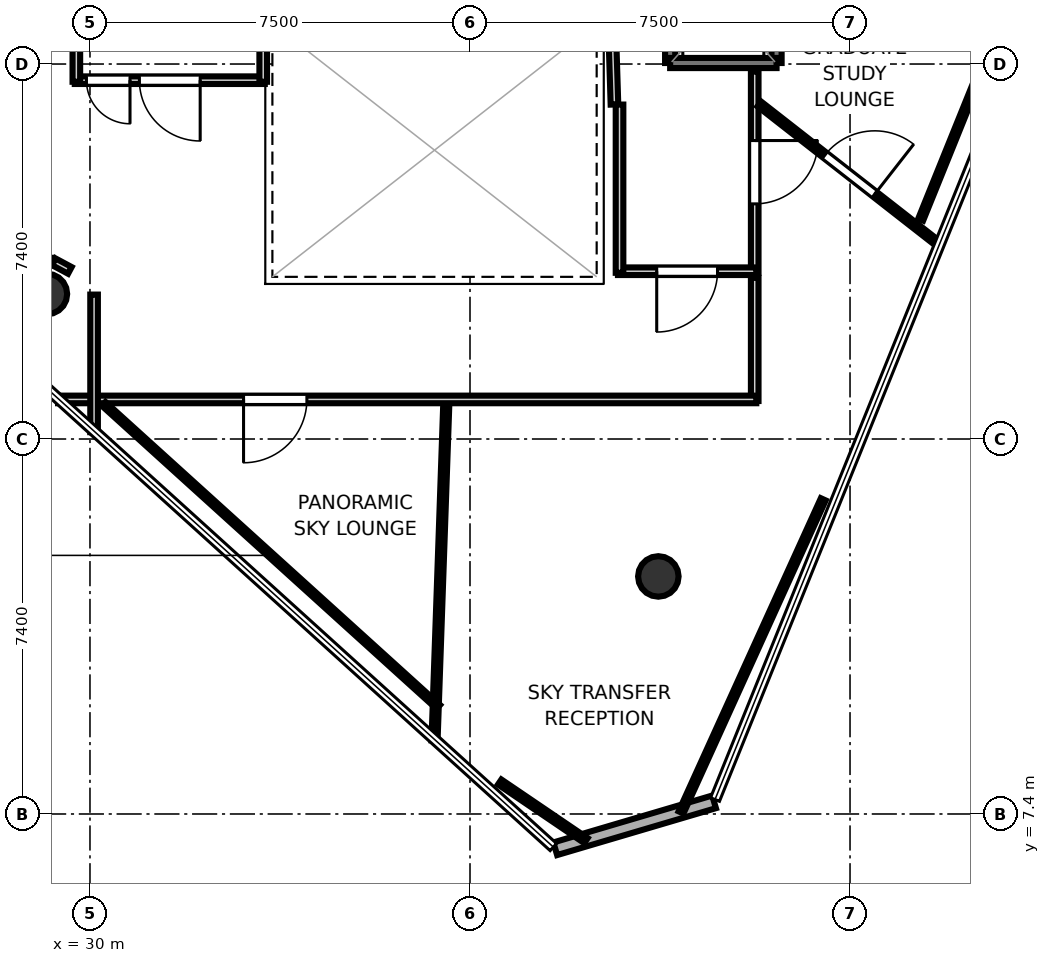
"""IFC4 building model, lengths in metres.
Left out: names, types, materials, properties, quantities, classifications, styles, units other than length and angle.
Written with IfcOpenShell. Run it as: python <this file> out.ifc"""

import sys

from ifc_helpers import new_model, si_unit, direction, frame, frame_2d, origin, origin_2d, place, context, subcontext, project, spatial, rectangle, hollow_circle, extrude, element, fill, save


model = new_model("IFC4")
c1 = context("Model", 3, precision=1e-05, world=origin(), true_north=direction((0.0, 1.0)))
c2 = subcontext(c1, "Body", "Model", "MODEL_VIEW")
j1 = project(units=[si_unit("LENGTHUNIT", "METRE"), si_unit("PLANEANGLEUNIT", "RADIAN")], contexts=[c1])
p1 = place(None, origin())
s1 = spatial("IfcSite", under=j1, at=p1, CompositionType="ELEMENT")
p2 = place(p1, origin())
s2 = spatial("IfcBuilding", under=s1, at=p2, CompositionType="ELEMENT")
p3 = place(p2, frame((0.0, 0.0, 351.8)))
s3 = spatial("IfcBuildingStorey", under=s2, at=p3, CompositionType="ELEMENT", Elevation=351.8)
for number, where, z_axis, x_axis in (
    (1, (29.15, 17.662, 0.0), (0.0, 0.0, 1.0), (1.0, 0.0, 0.0)),
    (2, (41.217, 12.088, 0.0), (0.0, 0.0, 1.0), (1.0, 0.0, 0.0)),
):
    element("IfcColumn", number, at=place(p3, frame(where, z_axis=z_axis, x_axis=x_axis)), inside=s3, PredefinedType="COLUMN", context=c2, shape_type="SweptSolid", body=[
        extrude(hollow_circle(Radius=0.4, WallThickness=0.022, at=origin_2d()), origin(), (0.0, 0.0, 1.0), 4.5),
    ])
p4 = place(p3, frame((39.183, 6.714, 0.0), z_axis=(0.0, 0.0, 1.0), x_axis=(0.959059220101, 0.283205600826, 0.0)))
e3 = element("IfcWall", 3, at=p4, inside=s3, PredefinedType="SOLIDWALL", context=c2, shape_type="SweptSolid", body=[
    extrude(rectangle(XDim=3.268, YDim=0.26, at=frame_2d((1.634, 0.0))), origin(), (0.0, 0.0, 1.0), 4.3),
])
p5 = place(p3, frame((43.55, 22.22, 0.0), z_axis=(0.0, 0.0, 1.0), x_axis=(0.0, 1.0, 0.0)))
e4 = element("IfcWall", 4, at=p5, inside=s3, PredefinedType="SOLIDWALL", context=c2, shape_type="SweptSolid", body=[
    extrude(rectangle(XDim=2.36, YDim=0.2, at=frame_2d((1.18, 0.0))), origin(), (0.0, 0.0, 1.0), 4.3),
])
p6 = place(p3, frame((41.45, 22.22, 0.0), z_axis=(0.0, 0.0, 1.0), x_axis=(0.0, 1.0, 0.0)))
e5 = element("IfcWall", 5, at=p6, inside=s3, PredefinedType="SOLIDWALL", context=c2, shape_type="SweptSolid", body=[
    extrude(rectangle(XDim=2.36, YDim=0.2, at=frame_2d((1.18, 0.0))), origin(), (0.0, 0.0, 1.0), 4.3),
])
p7 = place(p6, frame((0.63, 0.0, 0.0)))
e6 = element("IfcOpeningElement", 6, at=p7, cuts=e5, PredefinedType="OPENING", context=c2, shape_type="SweptSolid", body=[
    extrude(rectangle(XDim=1.1, YDim=2.15, at=frame_2d((0.55, 1.075))), frame((0.0, 0.11, 0.0), z_axis=(0.0, -1.0, 0.0), x_axis=(1.0, 0.0, 0.0)), (0.0, 0.0, 1.0), 0.22),
])
p8 = place(p3, frame((41.45, 22.22, 0.0), z_axis=(0.0, 0.0, 1.0), x_axis=(1.0, 0.0, 0.0)))
e7 = element("IfcWall", 7, at=p8, inside=s3, PredefinedType="SOLIDWALL", context=c2, shape_type="SweptSolid", body=[
    extrude(rectangle(XDim=2.1, YDim=0.2, at=frame_2d((1.05, 0.0))), origin(), (0.0, 0.0, 1.0), 4.3),
])
p9 = place(p3, frame((33.45, 21.881, 0.0), z_axis=(0.0, 0.0, 1.0), x_axis=(-1.0, 0.0, 0.0)))
e8 = element("IfcWall", 8, at=p9, inside=s3, PredefinedType="PARTITIONING", context=c2, shape_type="SweptSolid", body=[
    extrude(rectangle(XDim=3.75, YDim=0.15, at=frame_2d((1.875, 0.0))), origin(), (0.0, 0.0, 1.0), 2.82),
])
p10 = place(p9, frame((1.275, 0.0, 0.0)))
e9 = element("IfcOpeningElement", 9, at=p10, cuts=e8, PredefinedType="OPENING", context=c2, shape_type="SweptSolid", body=[
    extrude(rectangle(XDim=1.2, YDim=2.15, at=frame_2d((0.6, 1.075))), frame((0.0, 0.085, 0.0), z_axis=(0.0, -1.0, 0.0), x_axis=(1.0, 0.0, 0.0)), (0.0, 0.0, 1.0), 0.17),
])
p11 = place(p9, frame((2.66, 0.0, 0.0)))
e10 = element("IfcOpeningElement", 10, at=p11, cuts=e8, PredefinedType="OPENING", context=c2, shape_type="SweptSolid", body=[
    extrude(rectangle(XDim=0.86, YDim=2.05, at=frame_2d((0.43, 1.025))), frame((0.0, 0.085, 0.0), z_axis=(0.0, -1.0, 0.0), x_axis=(1.0, 0.0, 0.0)), (0.0, 0.0, 1.0), 0.17),
])
for number, where, z_axis, x_axis in (
    (11, (29.731, 21.85, 0.0), (0.0, 0.0, 1.0), (0.0, 1.0, 0.0)),
    (12, (33.419, 24.542, 0.0), (0.0, 0.0, 1.0), (0.0, -1.0, 0.0)),
):
    element("IfcWall", number, at=place(p3, frame(where, z_axis=z_axis, x_axis=x_axis)), inside=s3, PredefinedType="PARTITIONING", context=c2, shape_type="SweptSolid", body=[
        extrude(rectangle(XDim=2.692, YDim=0.15, at=frame_2d((1.346, 0.0))), origin(), (0.0, 0.0, 1.0), 2.82),
    ])
p12 = place(p3, frame((40.351, 21.401, 0.0), z_axis=(0.0, 0.0, 1.0), x_axis=(-0.031058045979, 0.999517582527, 0.0)))
e13 = element("IfcWall", 13, at=p12, inside=s3, PredefinedType="PARTITIONING", context=c2, shape_type="SweptSolid", body=[
    extrude(rectangle(XDim=1.682, YDim=0.15, at=frame_2d((0.841, 0.0))), origin(), (0.0, 0.0, 1.0), 2.82),
])
p13 = place(p3, frame((43.119, 22.05, 0.0), z_axis=(0.0, 0.0, 1.0), x_axis=(0.0, -1.0, 0.0)))
e14 = element("IfcWall", 14, at=p13, inside=s3, PredefinedType="PARTITIONING", context=c2, shape_type="SweptSolid", body=[
    extrude(rectangle(XDim=3.97, YDim=0.15, at=frame_2d((1.985, 0.0))), origin(), (0.0, 0.0, 1.0), 2.82),
])
p14 = place(p13, frame((1.36, 0.0, 0.0)))
e15 = element("IfcOpeningElement", 15, at=p14, cuts=e14, PredefinedType="OPENING", context=c2, shape_type="SweptSolid", body=[
    extrude(rectangle(XDim=1.25, YDim=2.2, at=frame_2d((0.625, 1.1))), frame((0.0, 0.085, 0.0), z_axis=(0.0, -1.0, 0.0), x_axis=(1.0, 0.0, 0.0)), (0.0, 0.0, 1.0), 0.17),
])
p15 = place(p3, frame((43.15, 18.111, 0.0), z_axis=(0.0, 0.0, 1.0), x_axis=(-1.0, 0.0, 0.0)))
e16 = element("IfcWall", 16, at=p15, inside=s3, PredefinedType="PARTITIONING", context=c2, shape_type="SweptSolid", body=[
    extrude(rectangle(XDim=2.73, YDim=0.15, at=frame_2d((1.365, 0.0))), origin(), (0.0, 0.0, 1.0), 2.82),
])
p16 = place(p15, frame((0.765, 0.0, 0.0)))
e17 = element("IfcOpeningElement", 17, at=p16, cuts=e16, PredefinedType="OPENING", context=c2, shape_type="SweptSolid", body=[
    extrude(rectangle(XDim=1.2, YDim=2.15, at=frame_2d((0.6, 1.075))), frame((0.0, 0.085, 0.0), z_axis=(0.0, -1.0, 0.0), x_axis=(1.0, 0.0, 0.0)), (0.0, 0.0, 1.0), 0.17),
])
p17 = place(p3, frame((40.451, 18.08, 0.0), z_axis=(0.0, 0.0, 1.0), x_axis=(0.0, 1.0, 0.0)))
e18 = element("IfcWall", 18, at=p17, inside=s3, PredefinedType="PARTITIONING", context=c2, shape_type="SweptSolid", body=[
    extrude(rectangle(XDim=3.32, YDim=0.15, at=frame_2d((1.66, 0.0))), origin(), (0.0, 0.0, 1.0), 2.82),
])
p18 = place(p3, frame((43.119, 17.98, 0.0), z_axis=(0.0, 0.0, 1.0), x_axis=(0.0, -1.0, 0.0)))
e19 = element("IfcWall", 19, at=p18, inside=s3, PredefinedType="PARTITIONING", context=c2, shape_type="SweptSolid", body=[
    extrude(rectangle(XDim=2.43, YDim=0.15, at=frame_2d((1.215, 0.0))), origin(), (0.0, 0.0, 1.0), 2.82),
])
p19 = place(p3, frame((43.15, 15.581, 0.0), z_axis=(0.0, 0.0, 1.0), x_axis=(-1.0, 0.0, 0.0)))
e20 = element("IfcWall", 20, at=p19, inside=s3, PredefinedType="PARTITIONING", context=c2, shape_type="SweptSolid", body=[
    extrude(rectangle(XDim=13.78, YDim=0.15, at=frame_2d((6.89, 0.0))), origin(), (0.0, 0.0, 1.0), 2.82),
])
p20 = place(p19, frame((8.869, 0.0, 0.0)))
e21 = element("IfcOpeningElement", 21, at=p20, cuts=e20, PredefinedType="OPENING", context=c2, shape_type="SweptSolid", body=[
    extrude(rectangle(XDim=1.25, YDim=2.2, at=frame_2d((0.625, 1.1))), frame((0.0, 0.085, 0.0), z_axis=(0.0, -1.0, 0.0), x_axis=(1.0, 0.0, 0.0)), (0.0, 0.0, 1.0), 0.17),
])
p21 = place(p3, frame((30.081, 14.935, 0.0), z_axis=(0.0, 0.0, 1.0), x_axis=(0.0, 1.0, 0.0)))
e22 = element("IfcWall", 22, at=p21, inside=s3, PredefinedType="PARTITIONING", context=c2, shape_type="SweptSolid", body=[
    extrude(rectangle(XDim=2.715, YDim=0.15, at=frame_2d((1.357, 0.0))), origin(), (0.0, 0.0, 1.0), 2.82),
])
for number, where, z_axis, x_axis in (
    (23, (29.603, 18.128, 0.0), (0.0, 0.0, 1.0), (-0.882, 0.471, 0.0)),
    (24, (29.268, 18.301, 0.0), (0.0, 0.0, 1.0), (-0.995, -0.098, 0.0)),
):
    element("IfcWall", number, at=place(p3, frame(where, z_axis=z_axis, x_axis=x_axis)), inside=s3, PredefinedType="PARTITIONING", context=c2, shape_type="SweptSolid", body=[
        extrude(rectangle(XDim=0.36, YDim=0.15, at=frame_2d((0.18, 0.0))), origin(), (0.0, 0.0, 1.0), 2.82),
    ])
p22 = place(p3, frame((36.874, 9.513, 0.0), z_axis=(0.0, 0.0, 1.0), x_axis=(-0.74127537666, 0.671201024997, 0.0)))
e25 = element("IfcWall", 25, at=p22, inside=s3, PredefinedType="PARTITIONING", context=c2, shape_type="SweptSolid", body=[
    extrude(rectangle(XDim=8.909, YDim=0.105, at=frame_2d((4.454, 0.0))), origin(), (0.0, 0.0, 1.0), 2.82),
])
p23 = place(p3, frame((37.031, 15.471, 0.0), z_axis=(0.0, 0.0, 1.0), x_axis=(-0.034900180344, -0.999390803146, 0.0)))
e26 = element("IfcWall", 26, at=p23, inside=s3, PredefinedType="PARTITIONING", context=c2, shape_type="SweptSolid", body=[
    extrude(rectangle(XDim=6.625, YDim=0.12, at=frame_2d((3.312, 0.0))), origin(), (0.0, 0.0, 1.0), 2.82),
])
p24 = place(p3, frame((43.211, 21.41, 0.0), z_axis=(0.0, 0.0, 1.0), x_axis=(0.788014562356, -0.615656600318, 0.0)))
e27 = element("IfcWall", 27, at=p24, inside=s3, PredefinedType="PARTITIONING", context=c2, shape_type="SweptSolid", body=[
    extrude(rectangle(XDim=4.527, YDim=0.12, at=frame_2d((2.264, 0.0))), origin(), (0.0, 0.0, 1.0), 2.82),
])
p25 = place(p24, frame((1.638, 0.0, 0.0)))
e28 = element("IfcOpeningElement", 28, at=p25, cuts=e27, PredefinedType="OPENING", context=c2, shape_type="SweptSolid", body=[
    extrude(rectangle(XDim=1.25, YDim=2.2, at=frame_2d((0.625, 1.1))), frame((0.0, 0.07, 0.0), z_axis=(0.0, -1.0, 0.0), x_axis=(1.0, 0.0, 0.0)), (0.0, 0.0, 1.0), 0.14),
])
p26 = place(p3, frame((44.472, 13.61, 0.0), z_axis=(0.0, 0.0, 1.0), x_axis=(-0.413564434072, -0.910474853508, 0.0)))
e29 = element("IfcWall", 29, at=p26, inside=s3, PredefinedType="PARTITIONING", context=c2, shape_type="SweptSolid", body=[
    extrude(rectangle(XDim=6.787, YDim=0.105, at=frame_2d((3.394, 0.0))), origin(), (0.0, 0.0, 1.0), 2.82),
])
p27 = place(p3, frame((39.788, 6.875, 0.0), z_axis=(0.0, 0.0, 1.0), x_axis=(-0.827330074337, 0.561716074274, 0.0)))
e30 = element("IfcWall", 30, at=p27, inside=s3, PredefinedType="PARTITIONING", context=c2, shape_type="SweptSolid", body=[
    extrude(rectangle(XDim=2.058, YDim=0.12, at=frame_2d((1.029, 0.0))), origin(), (0.0, 0.0, 1.0), 2.82),
])
p28 = place(p3, frame((48.224, 23.654, 0.0), z_axis=(0.0, 0.0, 1.0), x_axis=(-0.374802895176, -0.927104519333, 0.0)))
e31 = element("IfcWall", 31, at=p28, inside=s3, PredefinedType="PARTITIONING", context=c2, shape_type="SweptSolid", body=[
    extrude(rectangle(XDim=4.882, YDim=0.105, at=frame_2d((2.441, 0.0))), origin(), (0.0, 0.0, 1.0), 2.82),
])
p29 = place(p10, origin())
e32 = element("IfcDoor", 32, at=p29, inside=s3, OperationType="SINGLE_SWING_LEFT", PredefinedType="DOOR", context=c2, shape_type="SweptSolid", body=[
    extrude(rectangle(XDim=1.2, YDim=2.15, at=frame_2d((0.6, 1.075))), frame((0.0, 0.025, 0.0), z_axis=(0.0, -1.0, 0.0), x_axis=(1.0, 0.0, 0.0)), (0.0, 0.0, 1.0), 0.05),
])
fill(e9, e32)
p30 = place(p16, origin())
e33 = element("IfcDoor", 33, at=p30, inside=s3, OperationType="SINGLE_SWING_RIGHT", PredefinedType="DOOR", context=c2, shape_type="SweptSolid", body=[
    extrude(rectangle(XDim=1.2, YDim=2.15, at=frame_2d((0.6, 1.075))), frame((0.0, 0.025, 0.0), z_axis=(0.0, -1.0, 0.0), x_axis=(1.0, 0.0, 0.0)), (0.0, 0.0, 1.0), 0.05),
])
fill(e17, e33)
p31 = place(p11, origin())
e34 = element("IfcDoor", 34, at=p31, inside=s3, OperationType="SINGLE_SWING_LEFT", PredefinedType="DOOR", context=c2, shape_type="SweptSolid", body=[
    extrude(rectangle(XDim=0.86, YDim=2.05, at=frame_2d((0.43, 1.025))), frame((0.0, 0.025, 0.0), z_axis=(0.0, -1.0, 0.0), x_axis=(1.0, 0.0, 0.0)), (0.0, 0.0, 1.0), 0.05),
])
fill(e10, e34)
p32 = place(p20, origin())
e35 = element("IfcDoor", 35, at=p32, inside=s3, OperationType="SINGLE_SWING_RIGHT", PredefinedType="DOOR", context=c2, shape_type="SweptSolid", body=[
    extrude(rectangle(XDim=1.25, YDim=2.2, at=frame_2d((0.625, 1.1))), frame((0.0, 0.025, 0.0), z_axis=(0.0, -1.0, 0.0), x_axis=(1.0, 0.0, 0.0)), (0.0, 0.0, 1.0), 0.05),
])
fill(e21, e35)
p33 = place(p14, origin())
e36 = element("IfcDoor", 36, at=p33, inside=s3, OperationType="SINGLE_SWING_LEFT", PredefinedType="DOOR", context=c2, shape_type="SweptSolid", body=[
    extrude(rectangle(XDim=1.25, YDim=2.2, at=frame_2d((0.625, 1.1))), frame((0.0, 0.025, 0.0), z_axis=(0.0, -1.0, 0.0), x_axis=(1.0, 0.0, 0.0)), (0.0, 0.0, 1.0), 0.05),
])
fill(e15, e36)
p34 = place(p25, origin())
e37 = element("IfcDoor", 37, at=p34, inside=s3, OperationType="SINGLE_SWING_RIGHT", PredefinedType="DOOR", context=c2, shape_type="SweptSolid", body=[
    extrude(rectangle(XDim=1.25, YDim=2.2, at=frame_2d((0.625, 1.1))), frame((0.0, 0.025, 0.0), z_axis=(0.0, -1.0, 0.0), x_axis=(1.0, 0.0, 0.0)), (0.0, 0.0, 1.0), 0.05),
])
fill(e28, e37)
save(model, sys.argv[1])
